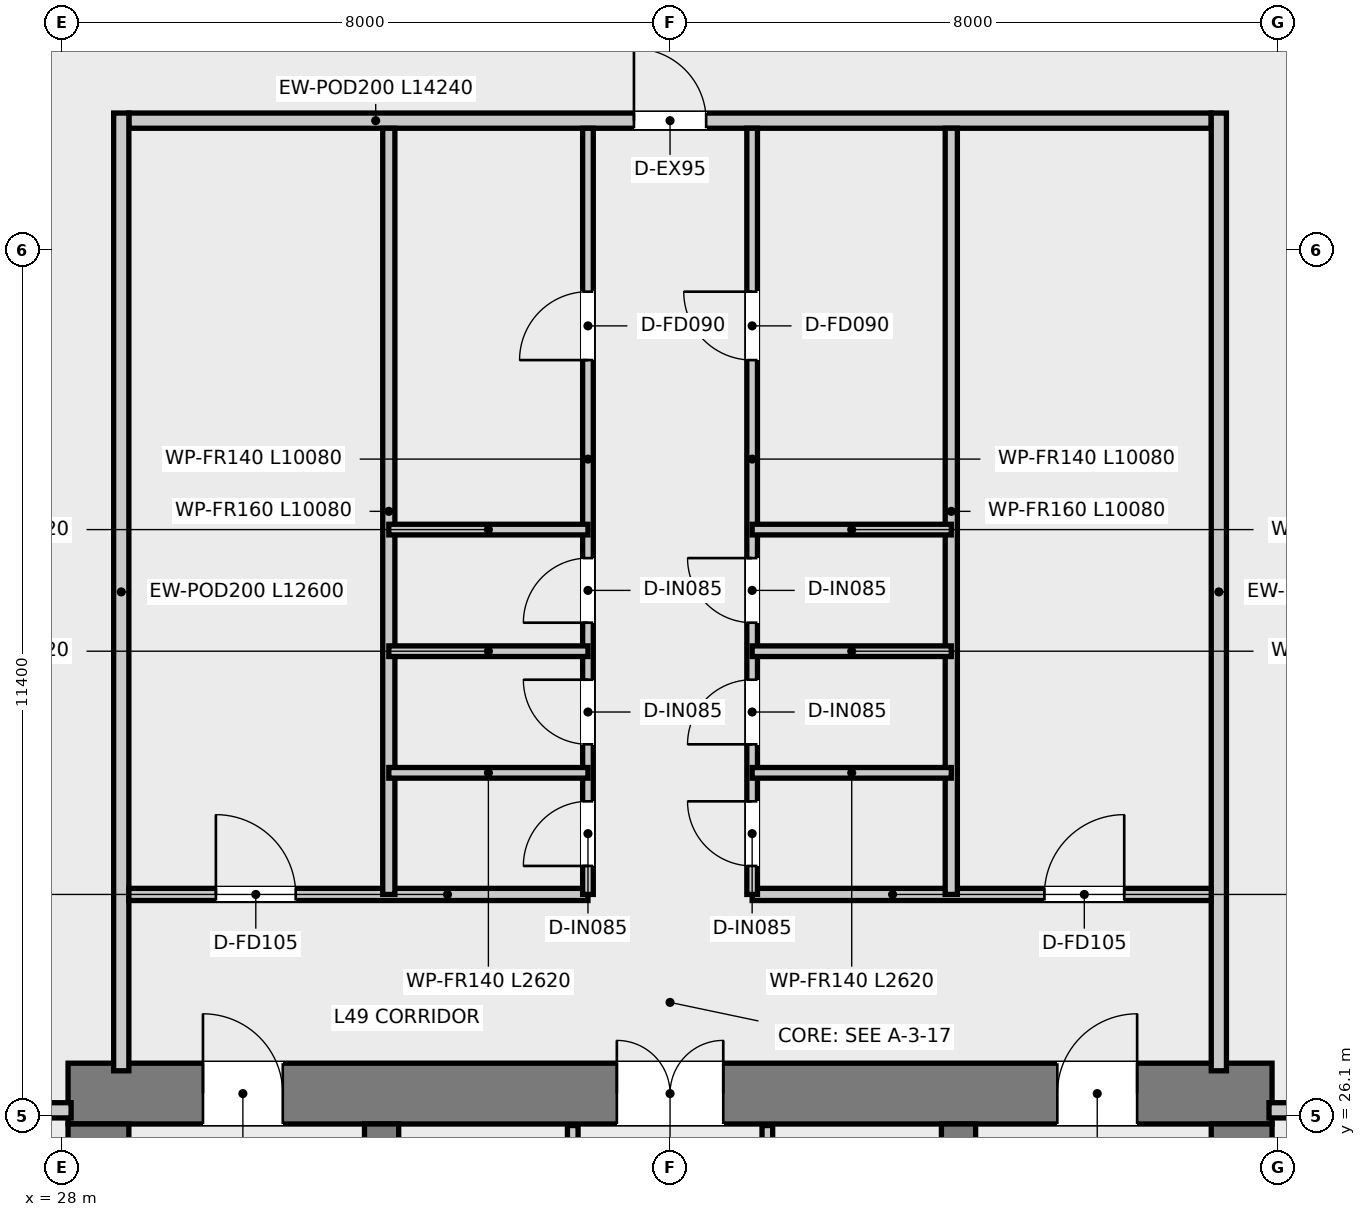
"""IFC4 building model, lengths in metres.
Left out: names, types, materials, properties, quantities, classifications, styles, units other than length and angle.
Written with IfcOpenShell. Run it as: python <this file> out.ifc"""

import sys

from ifc_helpers import new_model, si_unit, direction, frame, frame_2d, origin, place, context, subcontext, project, spatial, rectangle, extrude, element, fill, save


model = new_model("IFC4")
c1 = context("Model", 3, precision=1e-05, world=origin(), true_north=direction((0.0, 1.0)))
c2 = subcontext(c1, "Body", "Model", "MODEL_VIEW")
j1 = project(units=[si_unit("LENGTHUNIT", "METRE"), si_unit("PLANEANGLEUNIT", "RADIAN")], contexts=[c1])
p1 = place(None, origin())
s1 = spatial("IfcSite", under=j1, at=p1, CompositionType="ELEMENT")
p2 = place(p1, origin())
s2 = spatial("IfcBuilding", under=s1, at=p2, CompositionType="ELEMENT")
p3 = place(p2, frame((0.0, 0.0, 201.5)))
s3 = spatial("IfcBuildingStorey", under=s2, at=p3, CompositionType="ELEMENT", Elevation=201.5)
p4 = place(p3, frame((28.08, 26.4, 0.0), z_axis=(0.0, 0.0, 1.0), x_axis=(1.0, 0.0, 0.0)))
e1 = element("IfcWall", 1, at=p4, inside=s3, PredefinedType="SHEAR", context=c2, shape_type="SweptSolid", body=[
    extrude(rectangle(XDim=15.84, YDim=0.8, at=frame_2d((7.92, 0.0))), origin(), (0.0, 0.0, 1.0), 5.8),
])
p5 = place(p4, frame((7.22, 0.0, 0.0)))
e2 = element("IfcOpeningElement", 2, at=p5, cuts=e1, PredefinedType="OPENING", context=c2, shape_type="SweptSolid", body=[
    extrude(rectangle(XDim=1.4, YDim=2.2, at=frame_2d((0.7, 1.1))), frame((0.0, 0.41, 0.0), z_axis=(0.0, -1.0, 0.0), x_axis=(1.0, 0.0, 0.0)), (0.0, 0.0, 1.0), 0.82),
])
p6 = place(p4, frame((1.775, 0.0, 0.0)))
e3 = element("IfcOpeningElement", 3, at=p6, cuts=e1, PredefinedType="OPENING", context=c2, shape_type="SweptSolid", body=[
    extrude(rectangle(XDim=1.05, YDim=2.1, at=frame_2d((0.525, 1.05))), frame((0.0, 0.41, 0.0), z_axis=(0.0, -1.0, 0.0), x_axis=(1.0, 0.0, 0.0)), (0.0, 0.0, 1.0), 0.82),
])
p7 = place(p4, frame((13.015, 0.0, 0.0)))
e4 = element("IfcOpeningElement", 4, at=p7, cuts=e1, PredefinedType="OPENING", context=c2, shape_type="SweptSolid", body=[
    extrude(rectangle(XDim=1.05, YDim=2.1, at=frame_2d((0.525, 1.05))), frame((0.0, 0.41, 0.0), z_axis=(0.0, -1.0, 0.0), x_axis=(1.0, 0.0, 0.0)), (0.0, 0.0, 1.0), 0.82),
])
p8 = place(p3, frame((28.48, 11.3, 0.0), z_axis=(0.0, 0.0, 1.0), x_axis=(0.0, 1.0, 0.0)))
e5 = element("IfcWall", 5, at=p8, inside=s3, PredefinedType="SHEAR", context=c2, shape_type="SweptSolid", body=[
    extrude(rectangle(XDim=14.7, YDim=0.8, at=frame_2d((7.35, 0.0))), origin(), (0.0, 0.0, 1.0), 5.8),
])
p9 = place(p8, frame((11.675, 0.0, 0.0)))
e6 = element("IfcOpeningElement", 6, at=p9, cuts=e5, PredefinedType="OPENING", context=c2, shape_type="SweptSolid", body=[
    extrude(rectangle(XDim=1.05, YDim=2.1, at=frame_2d((0.525, 1.05))), frame((0.0, 0.41, 0.0), z_axis=(0.0, -1.0, 0.0), x_axis=(1.0, 0.0, 0.0)), (0.0, 0.0, 1.0), 0.82),
])
p10 = place(p3, frame((43.52, 11.3, 0.0), z_axis=(0.0, 0.0, 1.0), x_axis=(0.0, 1.0, 0.0)))
e7 = element("IfcWall", 7, at=p10, inside=s3, PredefinedType="SHEAR", context=c2, shape_type="SweptSolid", body=[
    extrude(rectangle(XDim=14.7, YDim=0.8, at=frame_2d((7.35, 0.0))), origin(), (0.0, 0.0, 1.0), 5.8),
])
p11 = place(p10, frame((11.675, 0.0, 0.0)))
e8 = element("IfcOpeningElement", 8, at=p11, cuts=e7, PredefinedType="OPENING", context=c2, shape_type="SweptSolid", body=[
    extrude(rectangle(XDim=1.05, YDim=2.1, at=frame_2d((0.525, 1.05))), frame((0.0, 0.41, 0.0), z_axis=(0.0, -1.0, 0.0), x_axis=(1.0, 0.0, 0.0)), (0.0, 0.0, 1.0), 0.82),
])
p12 = place(p3, frame((32.205, 13.22, 0.0), z_axis=(0.0, 0.0, 1.0), x_axis=(0.0, 1.0, 0.0)))
e9 = element("IfcWall", 9, at=p12, inside=s3, PredefinedType="SHEAR", context=c2, shape_type="SweptSolid", body=[
    extrude(rectangle(XDim=12.78, YDim=0.45, at=frame_2d((6.39, 0.0))), origin(), (0.0, 0.0, 1.0), 5.8),
])
p13 = place(p12, frame((10.58, 0.0, 0.0)))
e10 = element("IfcOpeningElement", 10, at=p13, cuts=e9, PredefinedType="OPENING", context=c2, shape_type="SweptSolid", body=[
    extrude(rectangle(XDim=1.1, YDim=2.15, at=frame_2d((0.55, 1.075))), frame((0.0, 0.235, 0.0), z_axis=(0.0, -1.0, 0.0), x_axis=(1.0, 0.0, 0.0)), (0.0, 0.0, 1.0), 0.47),
])
p14 = place(p3, frame((39.795, 13.22, 0.0), z_axis=(0.0, 0.0, 1.0), x_axis=(0.0, 1.0, 0.0)))
e11 = element("IfcWall", 11, at=p14, inside=s3, PredefinedType="SHEAR", context=c2, shape_type="SweptSolid", body=[
    extrude(rectangle(XDim=12.78, YDim=0.45, at=frame_2d((6.39, 0.0))), origin(), (0.0, 0.0, 1.0), 5.8),
])
p15 = place(p14, frame((10.58, 0.0, 0.0)))
e12 = element("IfcOpeningElement", 12, at=p15, cuts=e11, PredefinedType="OPENING", context=c2, shape_type="SweptSolid", body=[
    extrude(rectangle(XDim=1.1, YDim=2.15, at=frame_2d((0.55, 1.075))), frame((0.0, 0.235, 0.0), z_axis=(0.0, -1.0, 0.0), x_axis=(1.0, 0.0, 0.0)), (0.0, 0.0, 1.0), 0.47),
])
p16 = place(p3, frame((34.72, 20.2, 0.0), z_axis=(0.0, 0.0, 1.0), x_axis=(0.0, 1.0, 0.0)))
e13 = element("IfcWall", 13, at=p16, inside=s3, PredefinedType="PARTITIONING", context=c2, shape_type="SweptSolid", body=[
    extrude(rectangle(XDim=5.78, YDim=0.14, at=frame_2d((2.89, 0.0))), origin(), (0.0, 0.0, 1.0), 4.52),
])
p17 = place(p16, frame((1.05, 0.0, 0.0)))
e14 = element("IfcOpeningElement", 14, at=p17, cuts=e13, PredefinedType="OPENING", context=c2, shape_type="SweptSolid", body=[
    extrude(rectangle(XDim=0.9, YDim=2.1, at=frame_2d((0.45, 1.05))), frame((0.0, 0.08, 0.0), z_axis=(0.0, -1.0, 0.0), x_axis=(1.0, 0.0, 0.0)), (0.0, 0.0, 1.0), 0.16),
])
p18 = place(p3, frame((37.28, 20.2, 0.0), z_axis=(0.0, 0.0, 1.0), x_axis=(0.0, 1.0, 0.0)))
e15 = element("IfcWall", 15, at=p18, inside=s3, PredefinedType="PARTITIONING", context=c2, shape_type="SweptSolid", body=[
    extrude(rectangle(XDim=5.78, YDim=0.14, at=frame_2d((2.89, 0.0))), origin(), (0.0, 0.0, 1.0), 4.52),
])
p19 = place(p18, frame((0.95, 0.0, 0.0)))
e16 = element("IfcOpeningElement", 16, at=p19, cuts=e15, PredefinedType="OPENING", context=c2, shape_type="SweptSolid", body=[
    extrude(rectangle(XDim=1.1, YDim=2.15, at=frame_2d((0.55, 1.075))), frame((0.0, 0.08, 0.0), z_axis=(0.0, -1.0, 0.0), x_axis=(1.0, 0.0, 0.0)), (0.0, 0.0, 1.0), 0.16),
])
p20 = place(p3, frame((28.88, 39.2, 0.0), z_axis=(0.0, 0.0, 1.0), x_axis=(1.0, 0.0, 0.0)))
e17 = element("IfcWall", 17, at=p20, inside=s3, PredefinedType="SOLIDWALL", context=c2, shape_type="SweptSolid", body=[
    extrude(rectangle(XDim=14.24, YDim=0.2, at=frame_2d((7.12, 0.0))), origin(), (0.0, 0.0, 1.0), 4.93),
])
p21 = place(p20, frame((6.645, 0.0, 0.0)))
e18 = element("IfcOpeningElement", 18, at=p21, cuts=e17, PredefinedType="OPENING", context=c2, shape_type="SweptSolid", body=[
    extrude(rectangle(XDim=0.95, YDim=2.1, at=frame_2d((0.475, 1.05))), frame((0.0, 0.11, 0.0), z_axis=(0.0, -1.0, 0.0), x_axis=(1.0, 0.0, 0.0)), (0.0, 0.0, 1.0), 0.22),
])
for number, where, z_axis, x_axis in (
    (19, (28.78, 26.7, 0.0), (0.0, 0.0, 1.0), (0.0, 1.0, 0.0)),
    (20, (43.22, 26.7, 0.0), (0.0, 0.0, 1.0), (0.0, 1.0, 0.0)),
):
    element("IfcWall", number, at=place(p3, frame(where, z_axis=z_axis, x_axis=x_axis)), inside=s3, PredefinedType="SOLIDWALL", context=c2, shape_type="SweptSolid", body=[
        extrude(rectangle(XDim=12.6, YDim=0.2, at=frame_2d((6.3, 0.0))), origin(), (0.0, 0.0, 1.0), 4.88),
    ])
for number, where, z_axis, x_axis in (
    (21, (24.58, 26.18, 0.0), (0.0, 0.0, 1.0), (1.0, 0.0, 0.0)),
    (22, (43.88, 26.18, 0.0), (0.0, 0.0, 1.0), (1.0, 0.0, 0.0)),
):
    element("IfcWall", number, at=place(p3, frame(where, z_axis=z_axis, x_axis=x_axis)), inside=s3, PredefinedType="SOLIDWALL", context=c2, shape_type="SweptSolid", body=[
        extrude(rectangle(XDim=3.54, YDim=0.2, at=frame_2d((1.77, 0.0))), origin(), (0.0, 0.0, 1.0), 4.88),
    ])
p22 = place(p3, frame((28.88, 29.02, 0.0), z_axis=(0.0, 0.0, 1.0), x_axis=(1.0, 0.0, 0.0)))
e23 = element("IfcWall", 23, at=p22, inside=s3, PredefinedType="PARTITIONING", context=c2, shape_type="SweptSolid", body=[
    extrude(rectangle(XDim=6.04, YDim=0.16, at=frame_2d((3.02, 0.0))), origin(), (0.0, 0.0, 1.0), 4.93),
])
p23 = place(p22, frame((1.145, 0.0, 0.0)))
e24 = element("IfcOpeningElement", 24, at=p23, cuts=e23, PredefinedType="OPENING", context=c2, shape_type="SweptSolid", body=[
    extrude(rectangle(XDim=1.05, YDim=2.1, at=frame_2d((0.525, 1.05))), frame((0.0, 0.09, 0.0), z_axis=(0.0, -1.0, 0.0), x_axis=(1.0, 0.0, 0.0)), (0.0, 0.0, 1.0), 0.18),
])
p24 = place(p3, frame((37.08, 29.02, 0.0), z_axis=(0.0, 0.0, 1.0), x_axis=(1.0, 0.0, 0.0)))
e25 = element("IfcWall", 25, at=p24, inside=s3, PredefinedType="PARTITIONING", context=c2, shape_type="SweptSolid", body=[
    extrude(rectangle(XDim=6.04, YDim=0.16, at=frame_2d((3.02, 0.0))), origin(), (0.0, 0.0, 1.0), 4.93),
])
p25 = place(p24, frame((3.845, 0.0, 0.0)))
e26 = element("IfcOpeningElement", 26, at=p25, cuts=e25, PredefinedType="OPENING", context=c2, shape_type="SweptSolid", body=[
    extrude(rectangle(XDim=1.05, YDim=2.1, at=frame_2d((0.525, 1.05))), frame((0.0, 0.09, 0.0), z_axis=(0.0, -1.0, 0.0), x_axis=(1.0, 0.0, 0.0)), (0.0, 0.0, 1.0), 0.18),
])
for number, where, z_axis, x_axis in (
    (27, (32.3, 29.02, 0.0), (0.0, 0.0, 1.0), (0.0, 1.0, 0.0)),
    (28, (39.7, 29.02, 0.0), (0.0, 0.0, 1.0), (0.0, 1.0, 0.0)),
):
    element("IfcWall", number, at=place(p3, frame(where, z_axis=z_axis, x_axis=x_axis)), inside=s3, PredefinedType="PARTITIONING", context=c2, shape_type="SweptSolid", body=[
        extrude(rectangle(XDim=10.08, YDim=0.16, at=frame_2d((5.04, 0.0))), origin(), (0.0, 0.0, 1.0), 4.88),
    ])
p26 = place(p3, frame((34.92, 29.02, 0.0), z_axis=(0.0, 0.0, 1.0), x_axis=(0.0, 1.0, 0.0)))
e29 = element("IfcWall", 29, at=p26, inside=s3, PredefinedType="PARTITIONING", context=c2, shape_type="SweptSolid", body=[
    extrude(rectangle(XDim=10.08, YDim=0.14, at=frame_2d((5.04, 0.0))), origin(), (0.0, 0.0, 1.0), 4.88),
])
p27 = place(p26, frame((7.03, 0.0, 0.0)))
e30 = element("IfcOpeningElement", 30, at=p27, cuts=e29, PredefinedType="OPENING", context=c2, shape_type="SweptSolid", body=[
    extrude(rectangle(XDim=0.9, YDim=2.1, at=frame_2d((0.45, 1.05))), frame((0.0, 0.08, 0.0), z_axis=(0.0, -1.0, 0.0), x_axis=(1.0, 0.0, 0.0)), (0.0, 0.0, 1.0), 0.16),
])
p28 = place(p26, frame((0.375, 0.0, 0.0)))
e31 = element("IfcOpeningElement", 31, at=p28, cuts=e29, PredefinedType="OPENING", context=c2, shape_type="SweptSolid", body=[
    extrude(rectangle(XDim=0.85, YDim=2.1, at=frame_2d((0.425, 1.05))), frame((0.0, 0.08, 0.0), z_axis=(0.0, -1.0, 0.0), x_axis=(1.0, 0.0, 0.0)), (0.0, 0.0, 1.0), 0.16),
])
p29 = place(p26, frame((1.975, 0.0, 0.0)))
e32 = element("IfcOpeningElement", 32, at=p29, cuts=e29, PredefinedType="OPENING", context=c2, shape_type="SweptSolid", body=[
    extrude(rectangle(XDim=0.85, YDim=2.1, at=frame_2d((0.425, 1.05))), frame((0.0, 0.08, 0.0), z_axis=(0.0, -1.0, 0.0), x_axis=(1.0, 0.0, 0.0)), (0.0, 0.0, 1.0), 0.16),
])
p30 = place(p26, frame((3.575, 0.0, 0.0)))
e33 = element("IfcOpeningElement", 33, at=p30, cuts=e29, PredefinedType="OPENING", context=c2, shape_type="SweptSolid", body=[
    extrude(rectangle(XDim=0.85, YDim=2.1, at=frame_2d((0.425, 1.05))), frame((0.0, 0.08, 0.0), z_axis=(0.0, -1.0, 0.0), x_axis=(1.0, 0.0, 0.0)), (0.0, 0.0, 1.0), 0.16),
])
p31 = place(p3, frame((37.08, 29.02, 0.0), z_axis=(0.0, 0.0, 1.0), x_axis=(0.0, 1.0, 0.0)))
e34 = element("IfcWall", 34, at=p31, inside=s3, PredefinedType="PARTITIONING", context=c2, shape_type="SweptSolid", body=[
    extrude(rectangle(XDim=10.08, YDim=0.14, at=frame_2d((5.04, 0.0))), origin(), (0.0, 0.0, 1.0), 4.88),
])
p32 = place(p31, frame((7.03, 0.0, 0.0)))
e35 = element("IfcOpeningElement", 35, at=p32, cuts=e34, PredefinedType="OPENING", context=c2, shape_type="SweptSolid", body=[
    extrude(rectangle(XDim=0.9, YDim=2.1, at=frame_2d((0.45, 1.05))), frame((0.0, 0.08, 0.0), z_axis=(0.0, -1.0, 0.0), x_axis=(1.0, 0.0, 0.0)), (0.0, 0.0, 1.0), 0.16),
])
p33 = place(p31, frame((0.375, 0.0, 0.0)))
e36 = element("IfcOpeningElement", 36, at=p33, cuts=e34, PredefinedType="OPENING", context=c2, shape_type="SweptSolid", body=[
    extrude(rectangle(XDim=0.85, YDim=2.1, at=frame_2d((0.425, 1.05))), frame((0.0, 0.08, 0.0), z_axis=(0.0, -1.0, 0.0), x_axis=(1.0, 0.0, 0.0)), (0.0, 0.0, 1.0), 0.16),
])
p34 = place(p31, frame((1.975, 0.0, 0.0)))
e37 = element("IfcOpeningElement", 37, at=p34, cuts=e34, PredefinedType="OPENING", context=c2, shape_type="SweptSolid", body=[
    extrude(rectangle(XDim=0.85, YDim=2.1, at=frame_2d((0.425, 1.05))), frame((0.0, 0.08, 0.0), z_axis=(0.0, -1.0, 0.0), x_axis=(1.0, 0.0, 0.0)), (0.0, 0.0, 1.0), 0.16),
])
p35 = place(p31, frame((3.575, 0.0, 0.0)))
e38 = element("IfcOpeningElement", 38, at=p35, cuts=e34, PredefinedType="OPENING", context=c2, shape_type="SweptSolid", body=[
    extrude(rectangle(XDim=0.85, YDim=2.1, at=frame_2d((0.425, 1.05))), frame((0.0, 0.08, 0.0), z_axis=(0.0, -1.0, 0.0), x_axis=(1.0, 0.0, 0.0)), (0.0, 0.0, 1.0), 0.16),
])
for number, where, z_axis, x_axis in (
    (39, (32.3, 33.82, 0.0), (0.0, 0.0, 1.0), (1.0, 0.0, 0.0)),
    (40, (37.08, 33.82, 0.0), (0.0, 0.0, 1.0), (1.0, 0.0, 0.0)),
):
    element("IfcWall", number, at=place(p3, frame(where, z_axis=z_axis, x_axis=x_axis)), inside=s3, PredefinedType="PARTITIONING", context=c2, shape_type="SweptSolid", body=[
        extrude(rectangle(XDim=2.62, YDim=0.14, at=frame_2d((1.31, 0.0))), origin(), (0.0, 0.0, 1.0), 5.07),
    ])
for number, where, z_axis, x_axis in (
    (41, (32.3, 30.62, 0.0), (0.0, 0.0, 1.0), (1.0, 0.0, 0.0)),
    (42, (32.3, 32.22, 0.0), (0.0, 0.0, 1.0), (1.0, 0.0, 0.0)),
    (43, (37.08, 30.62, 0.0), (0.0, 0.0, 1.0), (1.0, 0.0, 0.0)),
    (44, (37.08, 32.22, 0.0), (0.0, 0.0, 1.0), (1.0, 0.0, 0.0)),
):
    element("IfcWall", number, at=place(p3, frame(where, z_axis=z_axis, x_axis=x_axis)), inside=s3, PredefinedType="PARTITIONING", context=c2, shape_type="SweptSolid", body=[
        extrude(rectangle(XDim=2.62, YDim=0.14, at=frame_2d((1.31, 0.0))), origin(), (0.0, 0.0, 1.0), 5.52),
    ])
p36 = place(p5, origin())
e45 = element("IfcDoor", 45, at=p36, inside=s3, OperationType="DOUBLE_DOOR_SINGLE_SWING", PredefinedType="DOOR", context=c2, shape_type="SweptSolid", body=[
    extrude(rectangle(XDim=1.4, YDim=2.2, at=frame_2d((0.7, 1.1))), frame((0.0, 0.025, 0.0), z_axis=(0.0, -1.0, 0.0), x_axis=(1.0, 0.0, 0.0)), (0.0, 0.0, 1.0), 0.05),
])
fill(e2, e45)
p37 = place(p6, origin())
e46 = element("IfcDoor", 46, at=p37, inside=s3, OperationType="SINGLE_SWING_LEFT", PredefinedType="DOOR", context=c2, shape_type="SweptSolid", body=[
    extrude(rectangle(XDim=1.05, YDim=2.1, at=frame_2d((0.525, 1.05))), frame((0.0, 0.025, 0.0), z_axis=(0.0, -1.0, 0.0), x_axis=(1.0, 0.0, 0.0)), (0.0, 0.0, 1.0), 0.05),
])
fill(e3, e46)
p38 = place(p7, origin())
e47 = element("IfcDoor", 47, at=p38, inside=s3, OperationType="SINGLE_SWING_RIGHT", PredefinedType="DOOR", context=c2, shape_type="SweptSolid", body=[
    extrude(rectangle(XDim=1.05, YDim=2.1, at=frame_2d((0.525, 1.05))), frame((0.0, 0.025, 0.0), z_axis=(0.0, -1.0, 0.0), x_axis=(1.0, 0.0, 0.0)), (0.0, 0.0, 1.0), 0.05),
])
fill(e4, e47)
p39 = place(p23, origin())
e48 = element("IfcDoor", 48, at=p39, inside=s3, OperationType="SINGLE_SWING_LEFT", PredefinedType="DOOR", context=c2, shape_type="SweptSolid", body=[
    extrude(rectangle(XDim=1.05, YDim=2.1, at=frame_2d((0.525, 1.05))), frame((0.0, 0.025, 0.0), z_axis=(0.0, -1.0, 0.0), x_axis=(1.0, 0.0, 0.0)), (0.0, 0.0, 1.0), 0.05),
])
fill(e24, e48)
p40 = place(p25, origin())
e49 = element("IfcDoor", 49, at=p40, inside=s3, OperationType="SINGLE_SWING_RIGHT", PredefinedType="DOOR", context=c2, shape_type="SweptSolid", body=[
    extrude(rectangle(XDim=1.05, YDim=2.1, at=frame_2d((0.525, 1.05))), frame((0.0, 0.025, 0.0), z_axis=(0.0, -1.0, 0.0), x_axis=(1.0, 0.0, 0.0)), (0.0, 0.0, 1.0), 0.05),
])
fill(e26, e49)
p41 = place(p27, origin())
e50 = element("IfcDoor", 50, at=p41, inside=s3, OperationType="SINGLE_SWING_LEFT", PredefinedType="DOOR", context=c2, shape_type="SweptSolid", body=[
    extrude(rectangle(XDim=0.9, YDim=2.1, at=frame_2d((0.45, 1.05))), frame((0.0, 0.025, 0.0), z_axis=(0.0, -1.0, 0.0), x_axis=(1.0, 0.0, 0.0)), (0.0, 0.0, 1.0), 0.05),
])
fill(e30, e50)
p42 = place(p32, origin())
e51 = element("IfcDoor", 51, at=p42, inside=s3, OperationType="SINGLE_SWING_RIGHT", PredefinedType="DOOR", context=c2, shape_type="SweptSolid", body=[
    extrude(rectangle(XDim=0.9, YDim=2.1, at=frame_2d((0.45, 1.05))), frame((0.0, 0.025, 0.0), z_axis=(0.0, -1.0, 0.0), x_axis=(1.0, 0.0, 0.0)), (0.0, 0.0, 1.0), 0.05),
])
fill(e35, e51)
p43 = place(p28, origin())
e52 = element("IfcDoor", 52, at=p43, inside=s3, OperationType="SINGLE_SWING_LEFT", PredefinedType="DOOR", context=c2, shape_type="SweptSolid", body=[
    extrude(rectangle(XDim=0.85, YDim=2.1, at=frame_2d((0.425, 1.05))), frame((0.0, 0.025, 0.0), z_axis=(0.0, -1.0, 0.0), x_axis=(1.0, 0.0, 0.0)), (0.0, 0.0, 1.0), 0.05),
])
fill(e31, e52)
p44 = place(p29, origin())
e53 = element("IfcDoor", 53, at=p44, inside=s3, OperationType="SINGLE_SWING_RIGHT", PredefinedType="DOOR", context=c2, shape_type="SweptSolid", body=[
    extrude(rectangle(XDim=0.85, YDim=2.1, at=frame_2d((0.425, 1.05))), frame((0.0, 0.025, 0.0), z_axis=(0.0, -1.0, 0.0), x_axis=(1.0, 0.0, 0.0)), (0.0, 0.0, 1.0), 0.05),
])
fill(e32, e53)
p45 = place(p30, origin())
e54 = element("IfcDoor", 54, at=p45, inside=s3, OperationType="SINGLE_SWING_LEFT", PredefinedType="DOOR", context=c2, shape_type="SweptSolid", body=[
    extrude(rectangle(XDim=0.85, YDim=2.1, at=frame_2d((0.425, 1.05))), frame((0.0, 0.025, 0.0), z_axis=(0.0, -1.0, 0.0), x_axis=(1.0, 0.0, 0.0)), (0.0, 0.0, 1.0), 0.05),
])
fill(e33, e54)
p46 = place(p33, origin())
e55 = element("IfcDoor", 55, at=p46, inside=s3, OperationType="SINGLE_SWING_RIGHT", PredefinedType="DOOR", context=c2, shape_type="SweptSolid", body=[
    extrude(rectangle(XDim=0.85, YDim=2.1, at=frame_2d((0.425, 1.05))), frame((0.0, 0.025, 0.0), z_axis=(0.0, -1.0, 0.0), x_axis=(1.0, 0.0, 0.0)), (0.0, 0.0, 1.0), 0.05),
])
fill(e36, e55)
p47 = place(p34, origin())
e56 = element("IfcDoor", 56, at=p47, inside=s3, OperationType="SINGLE_SWING_LEFT", PredefinedType="DOOR", context=c2, shape_type="SweptSolid", body=[
    extrude(rectangle(XDim=0.85, YDim=2.1, at=frame_2d((0.425, 1.05))), frame((0.0, 0.025, 0.0), z_axis=(0.0, -1.0, 0.0), x_axis=(1.0, 0.0, 0.0)), (0.0, 0.0, 1.0), 0.05),
])
fill(e37, e56)
p48 = place(p35, origin())
e57 = element("IfcDoor", 57, at=p48, inside=s3, OperationType="SINGLE_SWING_RIGHT", PredefinedType="DOOR", context=c2, shape_type="SweptSolid", body=[
    extrude(rectangle(XDim=0.85, YDim=2.1, at=frame_2d((0.425, 1.05))), frame((0.0, 0.025, 0.0), z_axis=(0.0, -1.0, 0.0), x_axis=(1.0, 0.0, 0.0)), (0.0, 0.0, 1.0), 0.05),
])
fill(e38, e57)
p49 = place(p21, origin())
e58 = element("IfcDoor", 58, at=p49, inside=s3, OperationType="SINGLE_SWING_LEFT", PredefinedType="DOOR", context=c2, shape_type="SweptSolid", body=[
    extrude(rectangle(XDim=0.95, YDim=2.1, at=frame_2d((0.475, 1.05))), frame((0.0, 0.025, 0.0), z_axis=(0.0, -1.0, 0.0), x_axis=(1.0, 0.0, 0.0)), (0.0, 0.0, 1.0), 0.05),
])
fill(e18, e58)
save(model, sys.argv[1])
